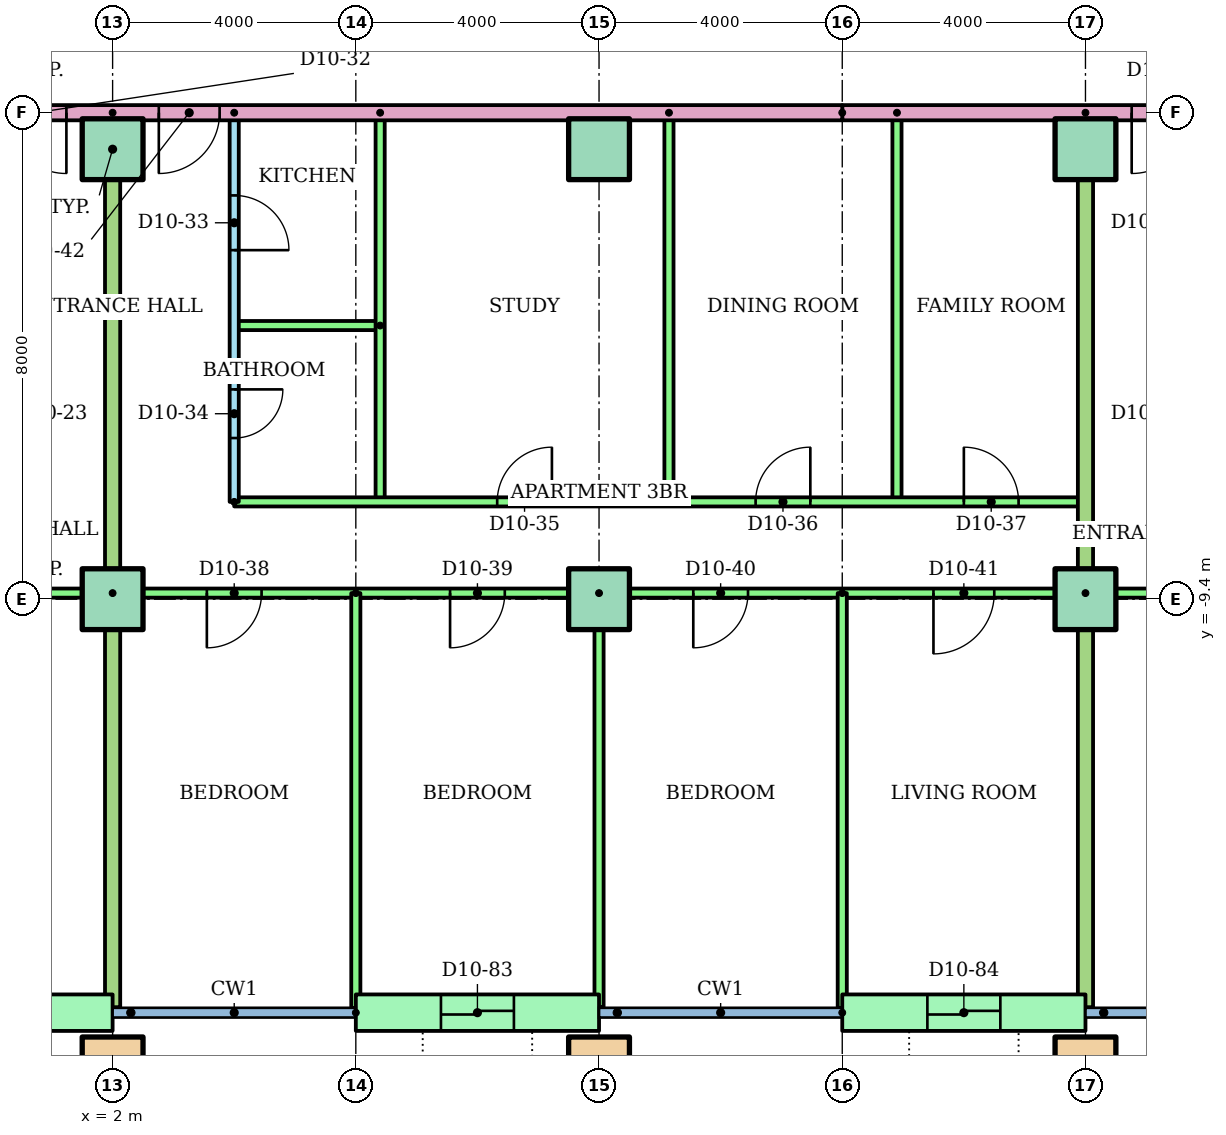
"""IFC4 building model, lengths in metres.
Left out: names, types, materials, properties, quantities, classifications, styles, units other than length and angle.
Written with IfcOpenShell. Run it as: python <this file> out.ifc"""

import sys

from ifc_helpers import new_model, si_unit, direction, frame, frame_2d, origin, origin_2d, place, context, subcontext, project, spatial, rectangle, hollow_rectangle, extrude, element, fill, save


model = new_model("IFC4")
c1 = context("Model", 3, precision=1e-05, world=origin(), true_north=direction((0.0, 1.0)))
c2 = subcontext(c1, "Body", "Model", "MODEL_VIEW")
j1 = project(units=[si_unit("LENGTHUNIT", "METRE"), si_unit("PLANEANGLEUNIT", "RADIAN")], contexts=[c1])
p1 = place(None, origin())
s1 = spatial("IfcSite", under=j1, at=p1, CompositionType="ELEMENT")
p2 = place(p1, origin())
s2 = spatial("IfcBuilding", under=s1, at=p2, CompositionType="ELEMENT")
p3 = place(p2, frame((0.0, 0.0, 41.6)))
s3 = spatial("IfcBuildingStorey", under=s2, at=p3, CompositionType="ELEMENT", Elevation=41.6)
for number, where in (
    (1, (2.0, -17.1, 0.0)),
    (2, (10.0, -17.1, 0.0)),
    (3, (18.0, -17.1, 0.0)),
):
    element("IfcColumn", number, at=place(p3, frame(where)), inside=s3, PredefinedType="COLUMN", context=c2, shape_type="SweptSolid", body=[
        extrude(hollow_rectangle(XDim=1.0, YDim=1.0, WallThickness=0.05, at=origin_2d()), origin(), (0.0, 0.0, 1.0), 3.2),
    ])
for number, where in (
    (4, (2.0, -9.4, 0.0)),
    (5, (10.0, -9.4, 0.0)),
    (6, (18.0, -9.4, 0.0)),
    (7, (2.0, -2.0, 0.0)),
    (8, (10.0, -2.0, 0.0)),
    (9, (18.0, -2.0, 0.0)),
):
    element("IfcColumn", number, at=place(p3, frame(where)), inside=s3, PredefinedType="COLUMN", context=c2, shape_type="SweptSolid", body=[
        extrude(rectangle(XDim=1.0, YDim=1.0, at=origin_2d()), origin(), (0.0, 0.0, 1.0), 3.2),
    ])
p4 = place(p3, frame((-2.0, -16.2, 0.0)))
e10 = element("IfcWall", 10, at=p4, inside=s3, PredefinedType="STANDARD", context=c2, shape_type="SweptSolid", body=[
    extrude(rectangle(XDim=4.0, YDim=0.6, at=frame_2d((2.0, 0.0))), origin(), (0.0, 0.0, 1.0), 2.92),
])
p5 = place(p4, frame((1.4, 0.0, 0.0)))
e11 = element("IfcOpeningElement", 11, at=p5, cuts=e10, PredefinedType="OPENING", context=c2, shape_type="SweptSolid", body=[
    extrude(rectangle(XDim=1.2, YDim=2.1, at=frame_2d((0.6, 1.05))), frame((0.0, 0.31, 0.0), z_axis=(0.0, -1.0, 0.0), x_axis=(1.0, 0.0, 0.0)), (0.0, 0.0, 1.0), 0.62),
])
p6 = place(p3, frame((6.0, -16.2, 0.0)))
e12 = element("IfcWall", 12, at=p6, inside=s3, PredefinedType="STANDARD", context=c2, shape_type="SweptSolid", body=[
    extrude(rectangle(XDim=4.0, YDim=0.6, at=frame_2d((2.0, 0.0))), origin(), (0.0, 0.0, 1.0), 2.92),
])
p7 = place(p6, frame((1.4, 0.0, 0.0)))
e13 = element("IfcOpeningElement", 13, at=p7, cuts=e12, PredefinedType="OPENING", context=c2, shape_type="SweptSolid", body=[
    extrude(rectangle(XDim=1.2, YDim=2.1, at=frame_2d((0.6, 1.05))), frame((0.0, 0.31, 0.0), z_axis=(0.0, -1.0, 0.0), x_axis=(1.0, 0.0, 0.0)), (0.0, 0.0, 1.0), 0.62),
])
p8 = place(p3, frame((14.0, -16.2, 0.0)))
e14 = element("IfcWall", 14, at=p8, inside=s3, PredefinedType="STANDARD", context=c2, shape_type="SweptSolid", body=[
    extrude(rectangle(XDim=4.0, YDim=0.6, at=frame_2d((2.0, 0.0))), origin(), (0.0, 0.0, 1.0), 2.92),
])
p9 = place(p8, frame((1.4, 0.0, 0.0)))
e15 = element("IfcOpeningElement", 15, at=p9, cuts=e14, PredefinedType="OPENING", context=c2, shape_type="SweptSolid", body=[
    extrude(rectangle(XDim=1.2, YDim=2.1, at=frame_2d((0.6, 1.05))), frame((0.0, 0.31, 0.0), z_axis=(0.0, -1.0, 0.0), x_axis=(1.0, 0.0, 0.0)), (0.0, 0.0, 1.0), 0.62),
])
p10 = place(p3, frame((2.0, -9.3, 0.0), z_axis=(0.0, 0.0, 1.0), x_axis=(-1.0, 0.0, 0.0)))
e16 = element("IfcWall", 16, at=p10, inside=s3, PredefinedType="PARTITIONING", context=c2, shape_type="SweptSolid", body=[
    extrude(rectangle(XDim=24.0, YDim=0.15, at=frame_2d((12.0, 0.0))), origin(), (0.0, 0.0, 1.0), 2.4),
])
p11 = place(p10, frame((19.5, 0.0, 0.0)))
e17 = element("IfcOpeningElement", 17, at=p11, cuts=e16, PredefinedType="OPENING", context=c2, shape_type="SweptSolid", body=[
    extrude(rectangle(XDim=1.0, YDim=2.1, at=frame_2d((0.5, 1.05))), frame((0.0, 0.085, 0.0), z_axis=(0.0, -1.0, 0.0), x_axis=(1.0, 0.0, 0.0)), (0.0, 0.0, 1.0), 0.17),
])
p12 = place(p10, frame((13.55, 0.0, 0.0)))
e18 = element("IfcOpeningElement", 18, at=p12, cuts=e16, PredefinedType="OPENING", context=c2, shape_type="SweptSolid", body=[
    extrude(rectangle(XDim=0.9, YDim=2.1, at=frame_2d((0.45, 1.05))), frame((0.0, 0.085, 0.0), z_axis=(0.0, -1.0, 0.0), x_axis=(1.0, 0.0, 0.0)), (0.0, 0.0, 1.0), 0.17),
])
p13 = place(p10, frame((9.55, 0.0, 0.0)))
e19 = element("IfcOpeningElement", 19, at=p13, cuts=e16, PredefinedType="OPENING", context=c2, shape_type="SweptSolid", body=[
    extrude(rectangle(XDim=0.9, YDim=2.1, at=frame_2d((0.45, 1.05))), frame((0.0, 0.085, 0.0), z_axis=(0.0, -1.0, 0.0), x_axis=(1.0, 0.0, 0.0)), (0.0, 0.0, 1.0), 0.17),
])
p14 = place(p10, frame((5.55, 0.0, 0.0)))
e20 = element("IfcOpeningElement", 20, at=p14, cuts=e16, PredefinedType="OPENING", context=c2, shape_type="SweptSolid", body=[
    extrude(rectangle(XDim=0.9, YDim=2.1, at=frame_2d((0.45, 1.05))), frame((0.0, 0.085, 0.0), z_axis=(0.0, -1.0, 0.0), x_axis=(1.0, 0.0, 0.0)), (0.0, 0.0, 1.0), 0.17),
])
p15 = place(p10, frame((1.55, 0.0, 0.0)))
e21 = element("IfcOpeningElement", 21, at=p15, cuts=e16, PredefinedType="OPENING", context=c2, shape_type="SweptSolid", body=[
    extrude(rectangle(XDim=0.9, YDim=2.1, at=frame_2d((0.45, 1.05))), frame((0.0, 0.085, 0.0), z_axis=(0.0, -1.0, 0.0), x_axis=(1.0, 0.0, 0.0)), (0.0, 0.0, 1.0), 0.17),
])
p16 = place(p3, frame((4.0, -1.4, 0.0), z_axis=(0.0, 0.0, 1.0), x_axis=(0.0, -1.0, 0.0)))
e22 = element("IfcWall", 22, at=p16, inside=s3, PredefinedType="PARTITIONING", context=c2, shape_type="SweptSolid", body=[
    extrude(rectangle(XDim=6.4, YDim=0.15, at=frame_2d((3.2, 0.0))), origin(), (0.0, 0.0, 1.0), 2.4),
])
p17 = place(p16, frame((1.36, 0.0, 0.0)))
e23 = element("IfcOpeningElement", 23, at=p17, cuts=e22, PredefinedType="OPENING", context=c2, shape_type="SweptSolid", body=[
    extrude(rectangle(XDim=0.9, YDim=2.1, at=frame_2d((0.45, 1.05))), frame((0.0, 0.085, 0.0), z_axis=(0.0, -1.0, 0.0), x_axis=(1.0, 0.0, 0.0)), (0.0, 0.0, 1.0), 0.17),
])
p18 = place(p16, frame((4.55, 0.0, 0.0)))
e24 = element("IfcOpeningElement", 24, at=p18, cuts=e22, PredefinedType="OPENING", context=c2, shape_type="SweptSolid", body=[
    extrude(rectangle(XDim=0.8, YDim=2.1, at=frame_2d((0.4, 1.05))), frame((0.0, 0.085, 0.0), z_axis=(0.0, -1.0, 0.0), x_axis=(1.0, 0.0, 0.0)), (0.0, 0.0, 1.0), 0.17),
])
p19 = place(p3, frame((6.4, -4.9, 0.0), z_axis=(0.0, 0.0, 1.0), x_axis=(-1.0, 0.0, 0.0)))
e25 = element("IfcWall", 25, at=p19, inside=s3, PredefinedType="PARTITIONING", context=c2, shape_type="SweptSolid", body=[
    extrude(rectangle(XDim=2.4, YDim=0.15, at=frame_2d((1.2, 0.0))), origin(), (0.0, 0.0, 1.0), 2.4),
])
for number, where, z_axis, x_axis in (
    (26, (6.4, -1.4, 0.0), (0.0, 0.0, 1.0), (0.0, -1.0, 0.0)),
    (27, (11.15, -1.4, 0.0), (0.0, 0.0, 1.0), (0.0, -1.0, 0.0)),
    (28, (14.9, -1.4, 0.0), (0.0, 0.0, 1.0), (0.0, -1.0, 0.0)),
):
    element("IfcWall", number, at=place(p3, frame(where, z_axis=z_axis, x_axis=x_axis)), inside=s3, PredefinedType="PARTITIONING", context=c2, shape_type="SweptSolid", body=[
        extrude(rectangle(XDim=6.4, YDim=0.15, at=frame_2d((3.2, 0.0))), origin(), (0.0, 0.0, 1.0), 2.4),
    ])
p20 = place(p3, frame((4.0, -7.8, 0.0)))
e29 = element("IfcWall", 29, at=p20, inside=s3, PredefinedType="PARTITIONING", context=c2, shape_type="SweptSolid", body=[
    extrude(rectangle(XDim=14.0, YDim=0.15, at=frame_2d((7.0, 0.0))), origin(), (0.0, 0.0, 1.0), 2.4),
])
p21 = place(p20, frame((4.325, 0.0, 0.0)))
e30 = element("IfcOpeningElement", 30, at=p21, cuts=e29, PredefinedType="OPENING", context=c2, shape_type="SweptSolid", body=[
    extrude(rectangle(XDim=0.9, YDim=2.1, at=frame_2d((0.45, 1.05))), frame((0.0, 0.085, 0.0), z_axis=(0.0, -1.0, 0.0), x_axis=(1.0, 0.0, 0.0)), (0.0, 0.0, 1.0), 0.17),
])
p22 = place(p20, frame((8.575, 0.0, 0.0)))
e31 = element("IfcOpeningElement", 31, at=p22, cuts=e29, PredefinedType="OPENING", context=c2, shape_type="SweptSolid", body=[
    extrude(rectangle(XDim=0.9, YDim=2.1, at=frame_2d((0.45, 1.05))), frame((0.0, 0.085, 0.0), z_axis=(0.0, -1.0, 0.0), x_axis=(1.0, 0.0, 0.0)), (0.0, 0.0, 1.0), 0.17),
])
p23 = place(p20, frame((12.0, 0.0, 0.0)))
e32 = element("IfcOpeningElement", 32, at=p23, cuts=e29, PredefinedType="OPENING", context=c2, shape_type="SweptSolid", body=[
    extrude(rectangle(XDim=0.9, YDim=2.1, at=frame_2d((0.45, 1.05))), frame((0.0, 0.085, 0.0), z_axis=(0.0, -1.0, 0.0), x_axis=(1.0, 0.0, 0.0)), (0.0, 0.0, 1.0), 0.17),
])
p24 = place(p3, frame((18.0, -9.3, 0.0), z_axis=(0.0, 0.0, 1.0), x_axis=(-1.0, 0.0, 0.0)))
e33 = element("IfcWall", 33, at=p24, inside=s3, PredefinedType="PARTITIONING", context=c2, shape_type="SweptSolid", body=[
    extrude(rectangle(XDim=16.0, YDim=0.15, at=frame_2d((8.0, 0.0))), origin(), (0.0, 0.0, 1.0), 2.4),
])
p25 = place(p24, frame((13.55, 0.0, 0.0)))
e34 = element("IfcOpeningElement", 34, at=p25, cuts=e33, PredefinedType="OPENING", context=c2, shape_type="SweptSolid", body=[
    extrude(rectangle(XDim=0.9, YDim=2.1, at=frame_2d((0.45, 1.05))), frame((0.0, 0.085, 0.0), z_axis=(0.0, -1.0, 0.0), x_axis=(1.0, 0.0, 0.0)), (0.0, 0.0, 1.0), 0.17),
])
p26 = place(p24, frame((9.55, 0.0, 0.0)))
e35 = element("IfcOpeningElement", 35, at=p26, cuts=e33, PredefinedType="OPENING", context=c2, shape_type="SweptSolid", body=[
    extrude(rectangle(XDim=0.9, YDim=2.1, at=frame_2d((0.45, 1.05))), frame((0.0, 0.085, 0.0), z_axis=(0.0, -1.0, 0.0), x_axis=(1.0, 0.0, 0.0)), (0.0, 0.0, 1.0), 0.17),
])
p27 = place(p24, frame((5.55, 0.0, 0.0)))
e36 = element("IfcOpeningElement", 36, at=p27, cuts=e33, PredefinedType="OPENING", context=c2, shape_type="SweptSolid", body=[
    extrude(rectangle(XDim=0.9, YDim=2.1, at=frame_2d((0.45, 1.05))), frame((0.0, 0.085, 0.0), z_axis=(0.0, -1.0, 0.0), x_axis=(1.0, 0.0, 0.0)), (0.0, 0.0, 1.0), 0.17),
])
p28 = place(p24, frame((1.5, 0.0, 0.0)))
e37 = element("IfcOpeningElement", 37, at=p28, cuts=e33, PredefinedType="OPENING", context=c2, shape_type="SweptSolid", body=[
    extrude(rectangle(XDim=1.0, YDim=2.1, at=frame_2d((0.5, 1.05))), frame((0.0, 0.085, 0.0), z_axis=(0.0, -1.0, 0.0), x_axis=(1.0, 0.0, 0.0)), (0.0, 0.0, 1.0), 0.17),
])
p29 = place(p3, frame((6.0, -9.3, 0.0), z_axis=(0.0, 0.0, 1.0), x_axis=(0.0, -1.0, 0.0)))
e38 = element("IfcWall", 38, at=p29, inside=s3, PredefinedType="PARTITIONING", context=c2, shape_type="SweptSolid", body=[
    extrude(rectangle(XDim=6.821, YDim=0.15, at=frame_2d((3.411, 0.0))), origin(), (0.0, 0.0, 1.0), 2.4),
])
p30 = place(p3, frame((10.0, -9.3, 0.0), z_axis=(0.0, 0.0, 1.0), x_axis=(0.0, -1.0, 0.0)))
e39 = element("IfcWall", 39, at=p30, inside=s3, PredefinedType="PARTITIONING", context=c2, shape_type="SweptSolid", body=[
    extrude(rectangle(XDim=6.81, YDim=0.15, at=frame_2d((3.405, 0.0))), origin(), (0.0, 0.0, 1.0), 2.4),
])
p31 = place(p3, frame((14.0, -9.3, 0.0), z_axis=(0.0, 0.0, 1.0), x_axis=(0.0, -1.0, 0.0)))
e40 = element("IfcWall", 40, at=p31, inside=s3, PredefinedType="PARTITIONING", context=c2, shape_type="SweptSolid", body=[
    extrude(rectangle(XDim=6.821, YDim=0.15, at=frame_2d((3.411, 0.0))), origin(), (0.0, 0.0, 1.0), 2.4),
])
p32 = place(p3, frame((2.0, -1.4, 0.0), z_axis=(0.0, 0.0, 1.0), x_axis=(0.0, -1.0, 0.0)))
e41 = element("IfcWall", 41, at=p32, inside=s3, PredefinedType="PARTITIONING", context=c2, shape_type="SweptSolid", body=[
    extrude(rectangle(XDim=14.71, YDim=0.25, at=frame_2d((7.355, 0.0))), origin(), (0.0, 0.0, 1.0), 2.4),
])
p33 = place(p3, frame((36.52, -9.3, 0.0), z_axis=(0.0, 0.0, 1.0), x_axis=(-1.0, 0.0, 0.0)))
e42 = element("IfcWall", 42, at=p33, inside=s3, PredefinedType="PARTITIONING", context=c2, shape_type="SweptSolid", body=[
    extrude(rectangle(XDim=18.52, YDim=0.15, at=frame_2d((9.26, 0.0))), origin(), (0.0, 0.0, 1.0), 2.4),
])
p34 = place(p33, frame((16.07, 0.0, 0.0)))
e43 = element("IfcOpeningElement", 43, at=p34, cuts=e42, PredefinedType="OPENING", context=c2, shape_type="SweptSolid", body=[
    extrude(rectangle(XDim=0.9, YDim=2.1, at=frame_2d((0.45, 1.05))), frame((0.0, 0.085, 0.0), z_axis=(0.0, -1.0, 0.0), x_axis=(1.0, 0.0, 0.0)), (0.0, 0.0, 1.0), 0.17),
])
p35 = place(p33, frame((12.02, 0.0, 0.0)))
e44 = element("IfcOpeningElement", 44, at=p35, cuts=e42, PredefinedType="OPENING", context=c2, shape_type="SweptSolid", body=[
    extrude(rectangle(XDim=1.0, YDim=2.1, at=frame_2d((0.5, 1.05))), frame((0.0, 0.085, 0.0), z_axis=(0.0, -1.0, 0.0), x_axis=(1.0, 0.0, 0.0)), (0.0, 0.0, 1.0), 0.17),
])
p36 = place(p33, frame((7.17, 0.0, 0.0)))
e45 = element("IfcOpeningElement", 45, at=p36, cuts=e42, PredefinedType="OPENING", context=c2, shape_type="SweptSolid", body=[
    extrude(rectangle(XDim=0.9, YDim=2.1, at=frame_2d((0.45, 1.05))), frame((0.0, 0.085, 0.0), z_axis=(0.0, -1.0, 0.0), x_axis=(1.0, 0.0, 0.0)), (0.0, 0.0, 1.0), 0.17),
])
p37 = place(p33, frame((0.86, 0.0, 0.0)))
e46 = element("IfcOpeningElement", 46, at=p37, cuts=e42, PredefinedType="OPENING", context=c2, shape_type="SweptSolid", body=[
    extrude(rectangle(XDim=0.9, YDim=2.1, at=frame_2d((0.45, 1.05))), frame((0.0, 0.085, 0.0), z_axis=(0.0, -1.0, 0.0), x_axis=(1.0, 0.0, 0.0)), (0.0, 0.0, 1.0), 0.17),
])
p38 = place(p3, frame((18.0, -1.4, 0.0), z_axis=(0.0, 0.0, 1.0), x_axis=(0.0, -1.0, 0.0)))
e47 = element("IfcWall", 47, at=p38, inside=s3, PredefinedType="PARTITIONING", context=c2, shape_type="SweptSolid", body=[
    extrude(rectangle(XDim=14.71, YDim=0.25, at=frame_2d((7.355, 0.0))), origin(), (0.0, 0.0, 1.0), 2.4),
])
p39 = place(p3, frame((29.0, -1.4, 0.0), z_axis=(0.0, 0.0, 1.0), x_axis=(-1.0, 0.0, 0.0)))
e48 = element("IfcWall", 48, at=p39, inside=s3, PredefinedType="PARTITIONING", context=c2, shape_type="SweptSolid", body=[
    extrude(rectangle(XDim=15.0, YDim=0.25, at=frame_2d((7.5, 0.0))), origin(), (0.0, 0.0, 1.0), 2.4),
])
p40 = place(p39, frame((9.24, 0.0, 0.0)))
e49 = element("IfcOpeningElement", 49, at=p40, cuts=e48, PredefinedType="OPENING", context=c2, shape_type="SweptSolid", body=[
    extrude(rectangle(XDim=1.0, YDim=2.1, at=frame_2d((0.5, 1.05))), frame((0.0, 0.135, 0.0), z_axis=(0.0, -1.0, 0.0), x_axis=(1.0, 0.0, 0.0)), (0.0, 0.0, 1.0), 0.27),
])
p41 = place(p3, frame((14.0, -1.4, 0.0), z_axis=(0.0, 0.0, 1.0), x_axis=(-1.0, 0.0, 0.0)))
e50 = element("IfcWall", 50, at=p41, inside=s3, PredefinedType="PARTITIONING", context=c2, shape_type="SweptSolid", body=[
    extrude(rectangle(XDim=28.0, YDim=0.25, at=frame_2d((14.0, 0.0))), origin(), (0.0, 0.0, 1.0), 2.4),
])
p42 = place(p41, frame((12.76, 0.0, 0.0)))
e51 = element("IfcOpeningElement", 51, at=p42, cuts=e50, PredefinedType="OPENING", context=c2, shape_type="SweptSolid", body=[
    extrude(rectangle(XDim=1.0, YDim=2.1, at=frame_2d((0.5, 1.05))), frame((0.0, 0.135, 0.0), z_axis=(0.0, -1.0, 0.0), x_axis=(1.0, 0.0, 0.0)), (0.0, 0.0, 1.0), 0.27),
])
p43 = place(p41, frame((10.24, 0.0, 0.0)))
e52 = element("IfcOpeningElement", 52, at=p43, cuts=e50, PredefinedType="OPENING", context=c2, shape_type="SweptSolid", body=[
    extrude(rectangle(XDim=1.0, YDim=2.1, at=frame_2d((0.5, 1.05))), frame((0.0, 0.135, 0.0), z_axis=(0.0, -1.0, 0.0), x_axis=(1.0, 0.0, 0.0)), (0.0, 0.0, 1.0), 0.27),
])
p44 = place(p42, origin())
e53 = element("IfcDoor", 53, at=p44, inside=s3, OperationType="SINGLE_SWING_LEFT", PredefinedType="DOOR", context=c2, shape_type="SweptSolid", body=[
    extrude(rectangle(XDim=1.0, YDim=2.1, at=frame_2d((0.5, 1.05))), frame((0.0, 0.025, 0.0), z_axis=(0.0, -1.0, 0.0), x_axis=(1.0, 0.0, 0.0)), (0.0, 0.0, 1.0), 0.05),
])
fill(e51, e53)
p45 = place(p17, origin())
e54 = element("IfcDoor", 54, at=p45, inside=s3, OperationType="SINGLE_SWING_RIGHT", PredefinedType="DOOR", context=c2, shape_type="SweptSolid", body=[
    extrude(rectangle(XDim=0.9, YDim=2.1, at=frame_2d((0.45, 1.05))), frame((0.0, 0.025, 0.0), z_axis=(0.0, -1.0, 0.0), x_axis=(1.0, 0.0, 0.0)), (0.0, 0.0, 1.0), 0.05),
])
fill(e23, e54)
p46 = place(p18, origin())
e55 = element("IfcDoor", 55, at=p46, inside=s3, OperationType="SINGLE_SWING_LEFT", PredefinedType="DOOR", context=c2, shape_type="SweptSolid", body=[
    extrude(rectangle(XDim=0.8, YDim=2.1, at=frame_2d((0.4, 1.05))), frame((0.0, 0.025, 0.0), z_axis=(0.0, -1.0, 0.0), x_axis=(1.0, 0.0, 0.0)), (0.0, 0.0, 1.0), 0.05),
])
fill(e24, e55)
p47 = place(p21, origin())
e56 = element("IfcDoor", 56, at=p47, inside=s3, OperationType="SINGLE_SWING_RIGHT", PredefinedType="DOOR", context=c2, shape_type="SweptSolid", body=[
    extrude(rectangle(XDim=0.9, YDim=2.1, at=frame_2d((0.45, 1.05))), frame((0.0, 0.025, 0.0), z_axis=(0.0, -1.0, 0.0), x_axis=(1.0, 0.0, 0.0)), (0.0, 0.0, 1.0), 0.05),
])
fill(e30, e56)
p48 = place(p22, origin())
e57 = element("IfcDoor", 57, at=p48, inside=s3, OperationType="SINGLE_SWING_RIGHT", PredefinedType="DOOR", context=c2, shape_type="SweptSolid", body=[
    extrude(rectangle(XDim=0.9, YDim=2.1, at=frame_2d((0.45, 1.05))), frame((0.0, 0.025, 0.0), z_axis=(0.0, -1.0, 0.0), x_axis=(1.0, 0.0, 0.0)), (0.0, 0.0, 1.0), 0.05),
])
fill(e31, e57)
p49 = place(p23, origin())
e58 = element("IfcDoor", 58, at=p49, inside=s3, OperationType="SINGLE_SWING_LEFT", PredefinedType="DOOR", context=c2, shape_type="SweptSolid", body=[
    extrude(rectangle(XDim=0.9, YDim=2.1, at=frame_2d((0.45, 1.05))), frame((0.0, 0.025, 0.0), z_axis=(0.0, -1.0, 0.0), x_axis=(1.0, 0.0, 0.0)), (0.0, 0.0, 1.0), 0.05),
])
fill(e32, e58)
p50 = place(p25, origin())
e59 = element("IfcDoor", 59, at=p50, inside=s3, OperationType="SINGLE_SWING_RIGHT", PredefinedType="DOOR", context=c2, shape_type="SweptSolid", body=[
    extrude(rectangle(XDim=0.9, YDim=2.1, at=frame_2d((0.45, 1.05))), frame((0.0, 0.025, 0.0), z_axis=(0.0, -1.0, 0.0), x_axis=(1.0, 0.0, 0.0)), (0.0, 0.0, 1.0), 0.05),
])
fill(e34, e59)
p51 = place(p26, origin())
e60 = element("IfcDoor", 60, at=p51, inside=s3, OperationType="SINGLE_SWING_RIGHT", PredefinedType="DOOR", context=c2, shape_type="SweptSolid", body=[
    extrude(rectangle(XDim=0.9, YDim=2.1, at=frame_2d((0.45, 1.05))), frame((0.0, 0.025, 0.0), z_axis=(0.0, -1.0, 0.0), x_axis=(1.0, 0.0, 0.0)), (0.0, 0.0, 1.0), 0.05),
])
fill(e35, e60)
p52 = place(p27, origin())
e61 = element("IfcDoor", 61, at=p52, inside=s3, OperationType="SINGLE_SWING_RIGHT", PredefinedType="DOOR", context=c2, shape_type="SweptSolid", body=[
    extrude(rectangle(XDim=0.9, YDim=2.1, at=frame_2d((0.45, 1.05))), frame((0.0, 0.025, 0.0), z_axis=(0.0, -1.0, 0.0), x_axis=(1.0, 0.0, 0.0)), (0.0, 0.0, 1.0), 0.05),
])
fill(e36, e61)
p53 = place(p28, origin())
e62 = element("IfcDoor", 62, at=p53, inside=s3, OperationType="SINGLE_SWING_RIGHT", PredefinedType="DOOR", context=c2, shape_type="SweptSolid", body=[
    extrude(rectangle(XDim=1.0, YDim=2.1, at=frame_2d((0.5, 1.05))), frame((0.0, 0.025, 0.0), z_axis=(0.0, -1.0, 0.0), x_axis=(1.0, 0.0, 0.0)), (0.0, 0.0, 1.0), 0.05),
])
fill(e37, e62)
p54 = place(p43, origin())
e63 = element("IfcDoor", 63, at=p54, inside=s3, OperationType="SINGLE_SWING_RIGHT", PredefinedType="DOOR", context=c2, shape_type="SweptSolid", body=[
    extrude(rectangle(XDim=1.0, YDim=2.1, at=frame_2d((0.5, 1.05))), frame((0.0, 0.025, 0.0), z_axis=(0.0, -1.0, 0.0), x_axis=(1.0, 0.0, 0.0)), (0.0, 0.0, 1.0), 0.05),
])
fill(e52, e63)
p55 = place(p40, origin())
e64 = element("IfcDoor", 64, at=p55, inside=s3, OperationType="SINGLE_SWING_RIGHT", PredefinedType="DOOR", context=c2, shape_type="SweptSolid", body=[
    extrude(rectangle(XDim=1.0, YDim=2.1, at=frame_2d((0.5, 1.05))), frame((0.0, 0.025, 0.0), z_axis=(0.0, -1.0, 0.0), x_axis=(1.0, 0.0, 0.0)), (0.0, 0.0, 1.0), 0.05),
])
fill(e49, e64)
p56 = place(p7, origin())
e65 = element("IfcDoor", 65, at=p56, inside=s3, OperationType="SLIDING_TO_LEFT", PredefinedType="DOOR", context=c2, shape_type="SweptSolid", body=[
    extrude(rectangle(XDim=1.2, YDim=2.1, at=frame_2d((0.6, 1.05))), frame((0.0, 0.025, 0.0), z_axis=(0.0, -1.0, 0.0), x_axis=(1.0, 0.0, 0.0)), (0.0, 0.0, 1.0), 0.05),
])
fill(e13, e65)
p57 = place(p9, origin())
e66 = element("IfcDoor", 66, at=p57, inside=s3, OperationType="SLIDING_TO_LEFT", PredefinedType="DOOR", context=c2, shape_type="SweptSolid", body=[
    extrude(rectangle(XDim=1.2, YDim=2.1, at=frame_2d((0.6, 1.05))), frame((0.0, 0.025, 0.0), z_axis=(0.0, -1.0, 0.0), x_axis=(1.0, 0.0, 0.0)), (0.0, 0.0, 1.0), 0.05),
])
fill(e15, e66)
save(model, sys.argv[1])
